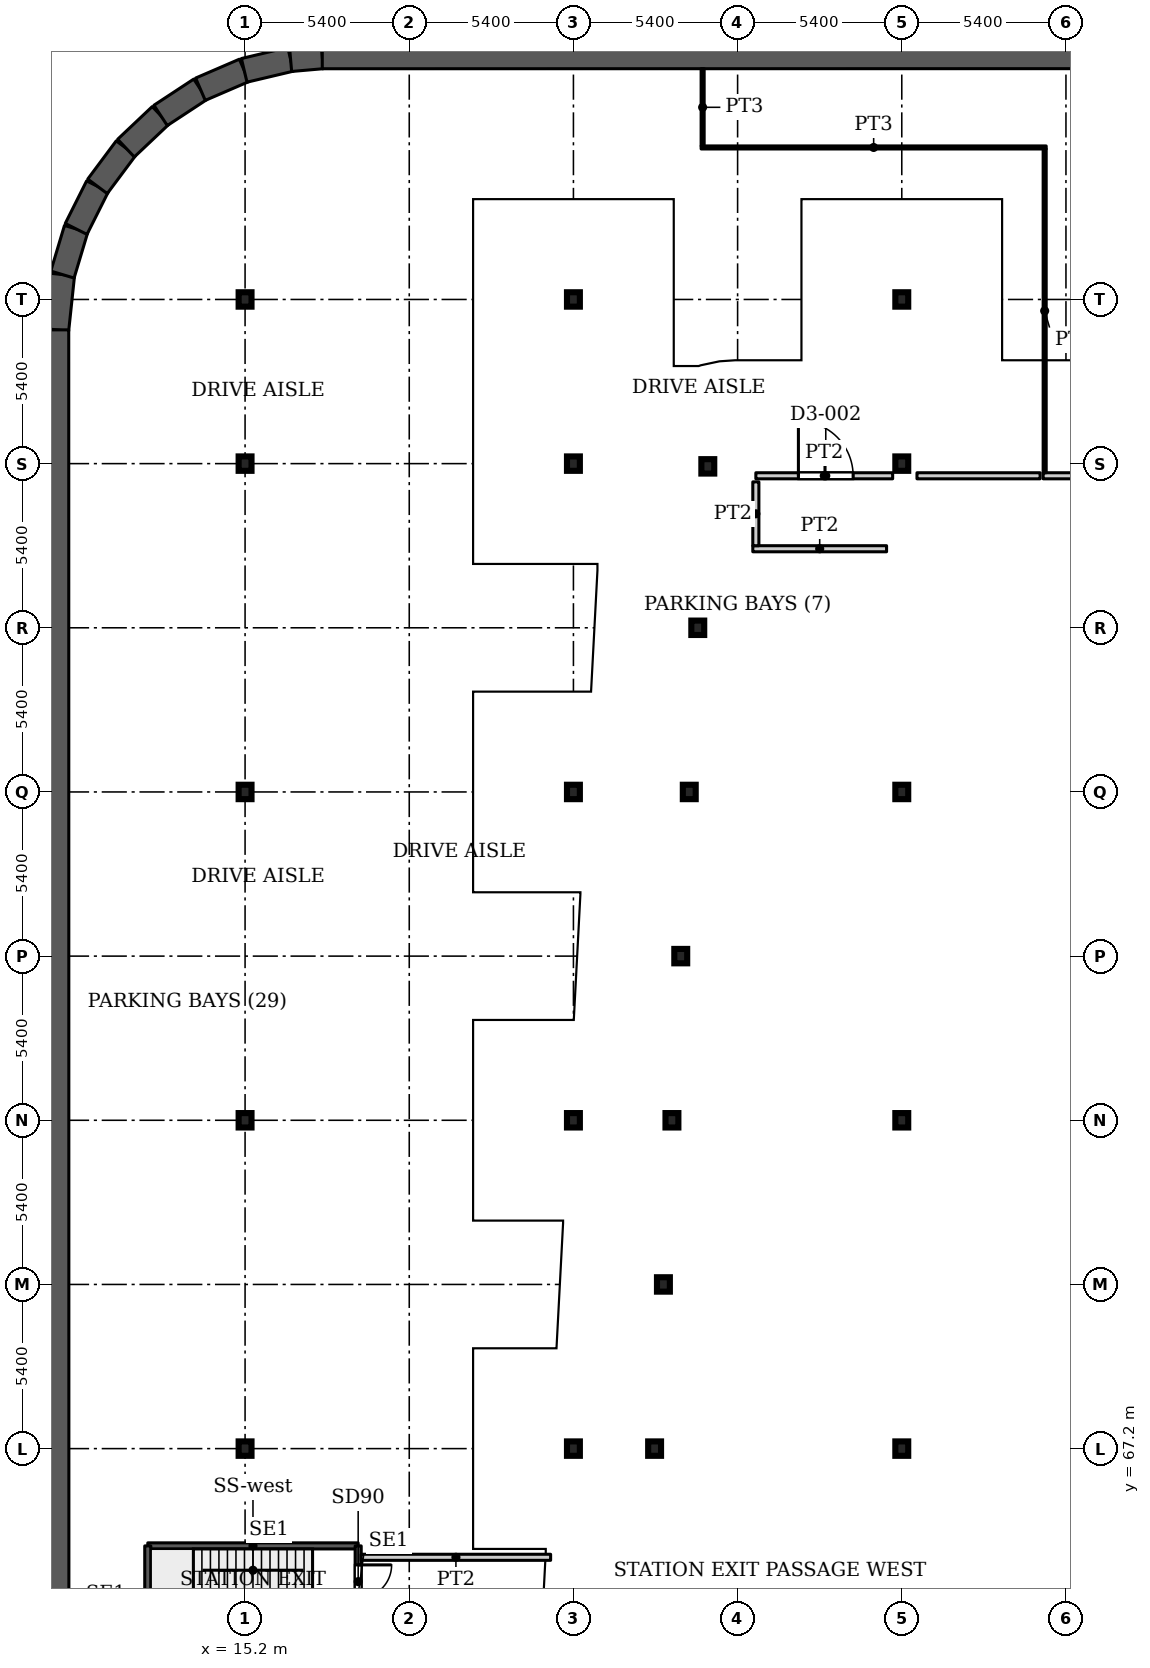
"""IFC4 building model, lengths in metres.
Left out: names, types, materials, properties, quantities, classifications, styles, units other than length and angle.
Written with IfcOpenShell. Run it as: python <this file> out.ifc"""

import sys

from ifc_helpers import new_model, si_unit, direction, frame, frame_2d, origin, origin_2d, place, context, subcontext, project, spatial, rectangle, i_section, extrude, source, transform, mapped, element, fill, save


model = new_model("IFC4")
c1 = context("Model", 3, precision=1e-05, world=origin(), true_north=direction((0.0, 1.0)))
c2 = subcontext(c1, "Body", "Model", "MODEL_VIEW")
j1 = project(units=[si_unit("LENGTHUNIT", "METRE"), si_unit("PLANEANGLEUNIT", "RADIAN")], contexts=[c1])
p1 = place(None, origin())
s1 = spatial("IfcSite", under=j1, at=p1, CompositionType="ELEMENT")
p2 = place(p1, origin())
s2 = spatial("IfcBuilding", under=s1, at=p2, CompositionType="ELEMENT")
p3 = place(p2, frame((0.0, 0.0, -15.0)))
s3 = spatial("IfcBuildingStorey", under=s2, at=p3, CompositionType="ELEMENT", Elevation=-15.0)
for number, where, z_axis, x_axis in (
    (1, (15.2, 67.2, 0.0), (0.0, 0.0, 1.0), (1.0, 0.0, 0.0)),
    (2, (26.0, 67.2, 0.0), (0.0, 0.0, 1.0), (1.0, 0.0, 0.0)),
    (3, (36.8, 67.2, 0.0), (0.0, 0.0, 1.0), (1.0, 0.0, 0.0)),
    (4, (15.2, 78.0, 0.0), (0.0, 0.0, 1.0), (1.0, 0.0, 0.0)),
    (5, (26.0, 78.0, 0.0), (0.0, 0.0, 1.0), (1.0, 0.0, 0.0)),
    (6, (36.8, 78.0, 0.0), (0.0, 0.0, 1.0), (1.0, 0.0, 0.0)),
    (7, (15.2, 88.8, 0.0), (0.0, 0.0, 1.0), (1.0, 0.0, 0.0)),
    (8, (26.0, 88.8, 0.0), (0.0, 0.0, 1.0), (1.0, 0.0, 0.0)),
    (9, (36.8, 88.8, 0.0), (0.0, 0.0, 1.0), (1.0, 0.0, 0.0)),
    (10, (15.2, 99.6, 0.0), (0.0, 0.0, 1.0), (1.0, 0.0, 0.0)),
    (11, (26.0, 99.6, 0.0), (0.0, 0.0, 1.0), (1.0, 0.0, 0.0)),
    (12, (36.8, 99.6, 0.0), (0.0, 0.0, 1.0), (1.0, 0.0, 0.0)),
    (13, (15.2, 105.0, 0.0), (0.0, 0.0, 1.0), (1.0, 0.0, 0.0)),
    (14, (26.0, 105.0, 0.0), (0.0, 0.0, 1.0), (1.0, 0.0, 0.0)),
    (15, (36.8, 105.0, 0.0), (0.0, 0.0, 1.0), (1.0, 0.0, 0.0)),
    (16, (28.67, 67.2, 0.0), (0.0, 0.0, 1.0), (1.0, 0.0, 0.0)),
    (17, (28.96, 72.6, 0.0), (0.0, 0.0, 1.0), (1.0, 0.0, 0.0)),
    (18, (29.24, 78.0, 0.0), (0.0, 0.0, 1.0), (1.0, 0.0, 0.0)),
    (19, (29.53, 83.4, 0.0), (0.0, 0.0, 1.0), (1.0, 0.0, 0.0)),
    (20, (29.81, 88.8, 0.0), (0.0, 0.0, 1.0), (1.0, 0.0, 0.0)),
    (21, (30.09, 94.2, 0.0), (0.0, 0.0, 1.0), (1.0, 0.0, 0.0)),
    (22, (30.42, 99.51, 0.0), (0.0, 0.0, 1.0), (1.0, 0.0, 0.0)),
):
    element("IfcColumn", number, at=place(p3, frame(where, z_axis=z_axis, x_axis=x_axis)), inside=s3, PredefinedType="COLUMN", context=c2, shape_type="SweptSolid", body=[
        extrude(i_section(OverallWidth=0.424, OverallDepth=0.474, WebThickness=0.048, FlangeThickness=0.077, FilletRadius=0.014, at=origin_2d()), origin(), (0.0, 0.0, 1.0), 5.0),
    ])
p4 = place(p3, frame((9.0, 104.0, 0.0), z_axis=(0.0, 0.0, 1.0), x_axis=(0.105567043429, 0.994412187849, 0.0)))
e23 = element("IfcWall", 23, at=p4, inside=s3, PredefinedType="SOLIDWALL", context=c2, shape_type="SweptSolid", body=[
    extrude(rectangle(XDim=1.829, YDim=0.8, at=frame_2d((0.915, 0.0))), origin(), (0.0, 0.0, 1.0), 5.0),
])
p5 = place(p3, frame((9.193, 105.819, 0.0), z_axis=(0.0, 0.0, 1.0), x_axis=(0.287147763375, 0.957886299092, 0.0)))
e24 = element("IfcWall", 24, at=p5, inside=s3, PredefinedType="SOLIDWALL", context=c2, shape_type="SweptSolid", body=[
    extrude(rectangle(XDim=1.567, YDim=0.8, at=frame_2d((0.783, 0.0))), origin(), (0.0, 0.0, 1.0), 5.0),
])
p6 = place(p3, frame((9.643, 107.32, 0.0), z_axis=(0.0, 0.0, 1.0), x_axis=(0.448459314462, 0.893803246399, 0.0)))
e25 = element("IfcWall", 25, at=p6, inside=s3, PredefinedType="SOLIDWALL", context=c2, shape_type="SweptSolid", body=[
    extrude(rectangle(XDim=1.567, YDim=0.8, at=frame_2d((0.784, 0.0))), origin(), (0.0, 0.0, 1.0), 5.0),
])
p7 = place(p3, frame((10.346, 108.721, 0.0), z_axis=(0.0, 0.0, 1.0), x_axis=(0.597630520512, 0.801771638905, 0.0)))
e26 = element("IfcWall", 26, at=p7, inside=s3, PredefinedType="SOLIDWALL", context=c2, shape_type="SweptSolid", body=[
    extrude(rectangle(XDim=1.568, YDim=0.8, at=frame_2d((0.784, 0.0))), origin(), (0.0, 0.0, 1.0), 5.0),
])
p8 = place(p3, frame((11.283, 109.978, 0.0), z_axis=(0.0, 0.0, 1.0), x_axis=(0.726995868662, 0.686641833089, 0.0)))
e27 = element("IfcWall", 27, at=p8, inside=s3, PredefinedType="SOLIDWALL", context=c2, shape_type="SweptSolid", body=[
    extrude(rectangle(XDim=1.567, YDim=0.8, at=frame_2d((0.783, 0.0))), origin(), (0.0, 0.0, 1.0), 5.0),
])
p9 = place(p3, frame((12.422, 111.054, 0.0), z_axis=(0.0, 0.0, 1.0), x_axis=(0.835603348101, 0.549333272834, 0.0)))
e28 = element("IfcWall", 28, at=p9, inside=s3, PredefinedType="SOLIDWALL", context=c2, shape_type="SweptSolid", body=[
    extrude(rectangle(XDim=1.568, YDim=0.8, at=frame_2d((0.784, 0.0))), origin(), (0.0, 0.0, 1.0), 5.0),
])
p10 = place(p3, frame((13.732, 111.915, 0.0), z_axis=(0.0, 0.0, 1.0), x_axis=(0.918183437355, 0.396155493925, 0.0)))
e29 = element("IfcWall", 29, at=p10, inside=s3, PredefinedType="SOLIDWALL", context=c2, shape_type="SweptSolid", body=[
    extrude(rectangle(XDim=1.567, YDim=0.8, at=frame_2d((0.784, 0.0))), origin(), (0.0, 0.0, 1.0), 5.0),
])
p11 = place(p3, frame((15.171, 112.536, 0.0), z_axis=(0.0, 0.0, 1.0), x_axis=(0.972992949439, 0.230834833469, 0.0)))
e30 = element("IfcWall", 30, at=p11, inside=s3, PredefinedType="SOLIDWALL", context=c2, shape_type="SweptSolid", body=[
    extrude(rectangle(XDim=1.569, YDim=0.8, at=frame_2d((0.784, 0.0))), origin(), (0.0, 0.0, 1.0), 5.0),
])
p12 = place(p3, frame((16.697, 112.898, 0.0), z_axis=(0.0, 0.0, 1.0), x_axis=(0.996202832813, 0.087062712427, 0.0)))
e31 = element("IfcWall", 31, at=p12, inside=s3, PredefinedType="SOLIDWALL", context=c2, shape_type="SweptSolid", body=[
    extrude(rectangle(XDim=1.046, YDim=0.8, at=frame_2d((0.523, 0.0))), origin(), (0.0, 0.0, 1.0), 5.0),
])
p13 = place(p3, frame((17.739, 112.989, 0.0), z_axis=(0.0, 0.0, 1.0), x_axis=(0.999999994851, 0.000101480029, 0.0)))
e32 = element("IfcWall", 32, at=p13, inside=s3, PredefinedType="SOLIDWALL", context=c2, shape_type="SweptSolid", body=[
    extrude(rectangle(XDim=108.261, YDim=0.8, at=frame_2d((54.13, 0.0))), origin(), (0.0, 0.0, 1.0), 5.0),
])
p14 = place(p3, frame((9.011, 15.739, 0.0), z_axis=(0.0, 0.0, 1.0), x_axis=(-0.000124475473, 0.999999992253, 0.0)))
e33 = element("IfcWall", 33, at=p14, inside=s3, PredefinedType="SOLIDWALL", context=c2, shape_type="SweptSolid", body=[
    extrude(rectangle(XDim=88.261, YDim=0.8, at=frame_2d((44.13, 0.0))), origin(), (0.0, 0.0, 1.0), 5.0),
])
p15 = place(p3, frame((12.0, 64.0, 0.0), z_axis=(0.0, 0.0, 1.0), x_axis=(1.0, 0.0, 0.0)))
e34 = element("IfcWall", 34, at=p15, inside=s3, PredefinedType="SHEAR", context=c2, shape_type="SweptSolid", body=[
    extrude(rectangle(XDim=6.92, YDim=0.2, at=frame_2d((3.46, 0.0))), origin(), (0.0, 0.0, 1.0), 5.0),
])
p16 = place(p3, frame((12.0, 60.85, 0.0), z_axis=(0.0, 0.0, 1.0), x_axis=(0.0, 1.0, 0.0)))
e35 = element("IfcWall", 35, at=p16, inside=s3, PredefinedType="SHEAR", context=c2, shape_type="SweptSolid", body=[
    extrude(rectangle(XDim=3.15, YDim=0.2, at=frame_2d((1.575, 0.0))), origin(), (0.0, 0.0, 1.0), 5.0),
])
p17 = place(p3, frame((18.92, 60.85, 0.0), z_axis=(0.0, 0.0, 1.0), x_axis=(0.0, 1.0, 0.0)))
e36 = element("IfcWall", 36, at=p17, inside=s3, PredefinedType="SHEAR", context=c2, shape_type="SweptSolid", body=[
    extrude(rectangle(XDim=3.15, YDim=0.2, at=frame_2d((1.575, 0.0))), origin(), (0.0, 0.0, 1.0), 5.0),
])
p18 = place(p17, frame((1.425, 0.0, 0.0)))
e37 = element("IfcOpeningElement", 37, at=p18, cuts=e36, PredefinedType="OPENING", context=c2, shape_type="SweptSolid", body=[
    extrude(rectangle(XDim=1.1, YDim=2.2, at=frame_2d((0.55, 1.1))), frame((0.0, 0.11, 0.0), z_axis=(0.0, -1.0, 0.0), x_axis=(1.0, 0.0, 0.0)), (0.0, 0.0, 1.0), 0.22),
])
p19 = place(p3, frame((19.02, 63.625, 0.0), z_axis=(0.0, 0.0, 1.0), x_axis=(1.0, 0.0, 0.0)))
e38 = element("IfcWall", 38, at=p19, inside=s3, PredefinedType="PARTITIONING", context=c2, shape_type="SweptSolid", body=[
    extrude(rectangle(XDim=6.23, YDim=0.2, at=frame_2d((3.115, 0.0))), origin(), (0.0, 0.0, 1.0), 4.68),
])
p20 = place(p3, frame((30.2, 110.0, 0.0), z_axis=(0.0, 0.0, 1.0), x_axis=(1.0, 0.0, 0.0)))
e39 = element("IfcWall", 39, at=p20, inside=s3, PredefinedType="PARTITIONING", context=c2, shape_type="SweptSolid", body=[
    extrude(rectangle(XDim=11.35, YDim=0.1, at=frame_2d((5.675, 0.0))), origin(), (0.0, 0.0, 1.0), 4.68),
])
p21 = place(p3, frame((30.25, 110.05, 0.0), z_axis=(0.0, 0.0, 1.0), x_axis=(0.0, 1.0, 0.0)))
e40 = element("IfcWall", 40, at=p21, inside=s3, PredefinedType="PARTITIONING", context=c2, shape_type="SweptSolid", body=[
    extrude(rectangle(XDim=2.541, YDim=0.1, at=frame_2d((1.271, 0.0))), origin(), (0.0, 0.0, 1.0), 4.68),
])
p22 = place(p3, frame((31.9, 96.8, 0.0), z_axis=(0.0, 0.0, 1.0), x_axis=(1.0, 0.0, 0.0)))
e41 = element("IfcWall", 41, at=p22, inside=s3, PredefinedType="PARTITIONING", context=c2, shape_type="SweptSolid", body=[
    extrude(rectangle(XDim=4.4, YDim=0.2, at=frame_2d((2.2, 0.0))), origin(), (0.0, 0.0, 1.0), 4.68),
])
p23 = place(p3, frame((32.0, 96.9, 0.0), z_axis=(0.0, 0.0, 1.0), x_axis=(0.0, 1.0, 0.0)))
e42 = element("IfcWall", 42, at=p23, inside=s3, PredefinedType="PARTITIONING", context=c2, shape_type="SweptSolid", body=[
    extrude(rectangle(XDim=2.1, YDim=0.2, at=frame_2d((1.05, 0.0))), origin(), (0.0, 0.0, 1.0), 4.68),
])
p24 = place(p3, frame((32.0, 99.2, 0.0), z_axis=(0.0, 0.0, 1.0), x_axis=(1.0, 0.0, 0.0)))
e43 = element("IfcWall", 43, at=p24, inside=s3, PredefinedType="PARTITIONING", context=c2, shape_type="SweptSolid", body=[
    extrude(rectangle(XDim=4.5, YDim=0.2, at=frame_2d((2.25, 0.0))), origin(), (0.0, 0.0, 1.0), 4.68),
])
p25 = place(p24, frame((1.4, 0.0, 0.0)))
e44 = element("IfcOpeningElement", 44, at=p25, cuts=e43, PredefinedType="OPENING", context=c2, shape_type="SweptSolid", body=[
    extrude(rectangle(XDim=1.8, YDim=2.1, at=frame_2d((0.9, 1.05))), frame((0.0, 0.11, 0.0), z_axis=(0.0, -1.0, 0.0), x_axis=(1.0, 0.0, 0.0)), (0.0, 0.0, 1.0), 0.22),
])
p26 = place(p3, frame((37.3, 99.2, 0.0), z_axis=(0.0, 0.0, 1.0), x_axis=(1.0, 0.0, 0.0)))
e45 = element("IfcWall", 45, at=p26, inside=s3, PredefinedType="PARTITIONING", context=c2, shape_type="SweptSolid", body=[
    extrude(rectangle(XDim=4.05, YDim=0.2, at=frame_2d((2.025, 0.0))), origin(), (0.0, 0.0, 1.0), 4.68),
])
p27 = place(p3, frame((41.45, 99.2, 0.0), z_axis=(0.0, 0.0, 1.0), x_axis=(1.0, 0.0, 0.0)))
e46 = element("IfcWall", 46, at=p27, inside=s3, PredefinedType="PARTITIONING", context=c2, shape_type="SweptSolid", body=[
    extrude(rectangle(XDim=4.55, YDim=0.2, at=frame_2d((2.275, 0.0))), origin(), (0.0, 0.0, 1.0), 4.68),
])
p28 = place(p27, frame((1.9, 0.0, 0.0)))
e47 = element("IfcOpeningElement", 47, at=p28, cuts=e46, PredefinedType="OPENING", context=c2, shape_type="SweptSolid", body=[
    extrude(rectangle(XDim=1.0, YDim=2.1, at=frame_2d((0.5, 1.05))), frame((0.0, 0.11, 0.0), z_axis=(0.0, -1.0, 0.0), x_axis=(1.0, 0.0, 0.0)), (0.0, 0.0, 1.0), 0.22),
])
p29 = place(p3, frame((41.5, 99.3, 0.0), z_axis=(0.0, 0.0, 1.0), x_axis=(0.0, 1.0, 0.0)))
e48 = element("IfcWall", 48, at=p29, inside=s3, PredefinedType="PARTITIONING", context=c2, shape_type="SweptSolid", body=[
    extrude(rectangle(XDim=10.65, YDim=0.1, at=frame_2d((5.325, 0.0))), origin(), (0.0, 0.0, 1.0), 4.68),
])
m1 = source(origin(), c2, "Body", "SweptSolid", [
    extrude(rectangle(XDim=1.1, YDim=2.2, at=frame_2d((0.55, 1.1))), frame((0.0, 0.025, 0.0), z_axis=(0.0, -1.0, 0.0), x_axis=(1.0, 0.0, 0.0)), (0.0, 0.0, 1.0), 0.05),
])
p30 = place(p18, origin())
e49 = element("IfcDoor", 49, at=p30, inside=s3, OperationType="SINGLE_SWING_RIGHT", PredefinedType="DOOR", context=c2, shape_type="MappedRepresentation", body=[
    mapped(m1, transform((0.0, 0.0, 0.0), x_axis=(1.0, 0.0, 0.0), y_axis=(0.0, 1.0, 0.0), z_axis=(0.0, 0.0, 1.0), scale=1.0)),
])
fill(e37, e49)
m2 = source(origin(), c2, "Body", "SweptSolid", [
    extrude(rectangle(XDim=1.8, YDim=2.1, at=frame_2d((0.9, 1.05))), frame((0.0, 0.025, 0.0), z_axis=(0.0, -1.0, 0.0), x_axis=(1.0, 0.0, 0.0)), (0.0, 0.0, 1.0), 0.05),
])
p31 = place(p25, origin())
e50 = element("IfcDoor", 50, at=p31, inside=s3, OperationType="DOUBLE_DOOR_SINGLE_SWING", PredefinedType="DOOR", context=c2, shape_type="MappedRepresentation", body=[
    mapped(m2, transform((0.0, 0.0, 0.0), x_axis=(1.0, 0.0, 0.0), y_axis=(0.0, 1.0, 0.0), z_axis=(0.0, 0.0, 1.0), scale=1.0)),
])
fill(e44, e50)
save(model, sys.argv[1])
